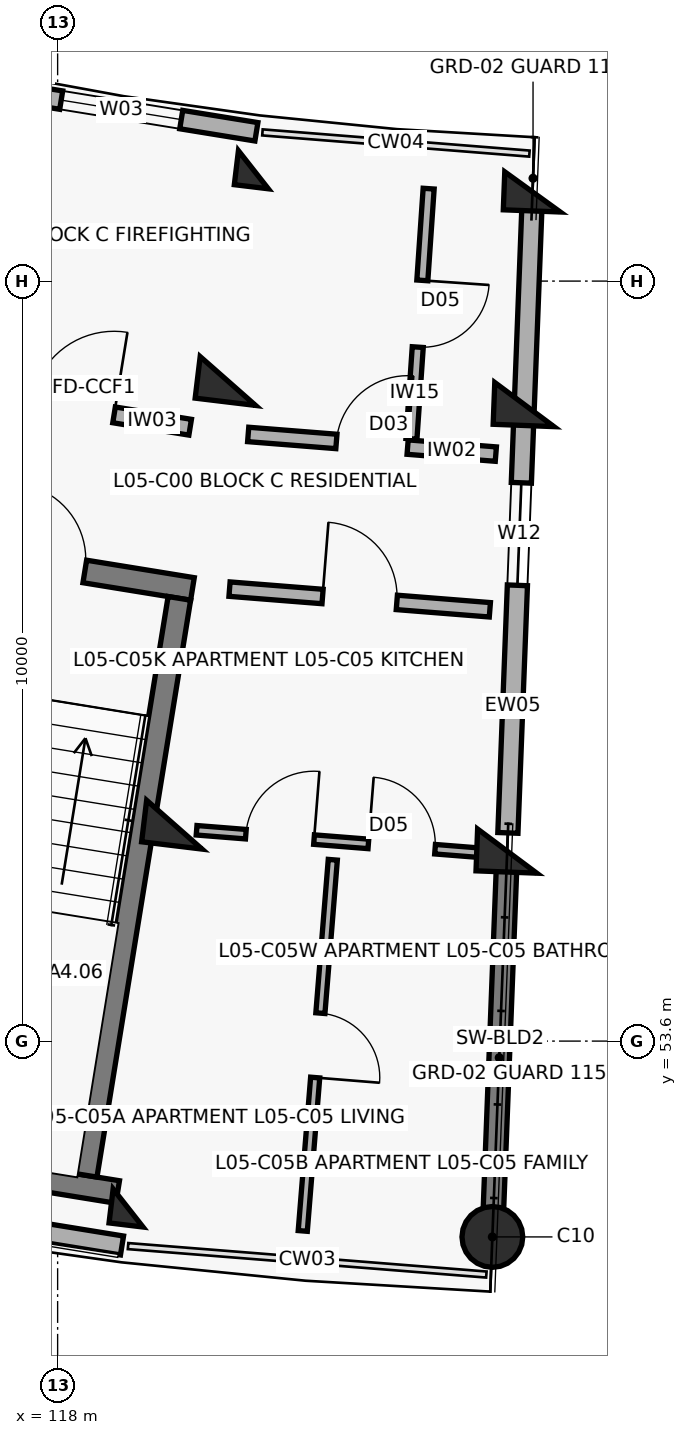
"""IFC4 building model, lengths in metres.
Left out: names, types, materials, properties, quantities, classifications, styles, units other than length and angle.
Written with IfcOpenShell. Run it as: python <this file> out.ifc"""

import sys

from ifc_helpers import new_model, si_unit, direction, frame, frame_2d, origin, origin_2d, place, context, subcontext, project, spatial, rectangle, circle, extrude, element, fill, save


model = new_model("IFC4")
c1 = context("Model", 3, precision=1e-05, world=origin(), true_north=direction((0.0, 1.0)))
c2 = subcontext(c1, "Body", "Model", "MODEL_VIEW")
j1 = project(units=[si_unit("LENGTHUNIT", "METRE"), si_unit("PLANEANGLEUNIT", "RADIAN")], contexts=[c1])
p1 = place(None, origin())
s1 = spatial("IfcSite", under=j1, at=p1, CompositionType="ELEMENT")
p2 = place(p1, origin())
s2 = spatial("IfcBuilding", under=s1, at=p2, CompositionType="ELEMENT")
p3 = place(p2, frame((0.0, 0.0, 17.4)))
s3 = spatial("IfcBuildingStorey", under=s2, at=p3, CompositionType="ELEMENT", Elevation=17.4)
p4 = place(p3, frame((120.575, 65.065, 0.0), z_axis=(0.0, 0.0, 1.0), x_axis=(-0.119790293837, -0.992799217114, 0.0)))
e1 = element("IfcColumn", 1, at=p4, inside=s3, PredefinedType="COLUMN", context=c2, shape_type="SweptSolid", body=[
    extrude(rectangle(XDim=0.45, YDim=0.45, at=origin_2d()), origin(), (0.0, 0.0, 1.0), 3.1),
])
for number, where, z_axis, x_axis in (
    (2, (120.24, 62.285, 0.0), (0.0, 0.0, 1.0), (-0.12, -0.993, 0.0)),
    (3, (119.535, 56.448, 0.0), (0.0, 0.0, 1.0), (-0.12, -0.993, 0.0)),
):
    element("IfcColumn", number, at=place(p3, frame(where, z_axis=z_axis, x_axis=x_axis)), inside=s3, PredefinedType="COLUMN", context=c2, shape_type="SweptSolid", body=[
        extrude(rectangle(XDim=0.55, YDim=0.8, at=origin_2d()), origin(), (0.0, 0.0, 1.0), 3.1),
    ])
p5 = place(p3, frame((118.927, 51.404, 0.0), z_axis=(0.0, 0.0, 1.0), x_axis=(-0.119790293837, -0.992799217114, 0.0)))
e4 = element("IfcColumn", 4, at=p5, inside=s3, PredefinedType="COLUMN", context=c2, shape_type="SweptSolid", body=[
    extrude(rectangle(XDim=0.45, YDim=0.45, at=origin_2d()), origin(), (0.0, 0.0, 1.0), 3.1),
])
p6 = place(p3, frame((124.248, 64.773, 0.0), z_axis=(0.0, 0.0, 1.0), x_axis=(-0.038387809088, -0.999262916411, 0.0)))
e5 = element("IfcColumn", 5, at=p6, inside=s3, PredefinedType="COLUMN", context=c2, shape_type="SweptSolid", body=[
    extrude(rectangle(XDim=0.5, YDim=0.75, at=origin_2d()), origin(), (0.0, 0.0, 1.0), 3.1),
])
for number, where, z_axis, x_axis in (
    (6, (124.14, 61.975, 0.0), (0.0, 0.0, 1.0), (-0.038, -0.999, 0.0)),
    (7, (123.915, 56.1, 0.0), (0.0, 0.0, 1.0), (-0.038, -0.999, 0.0)),
):
    element("IfcColumn", number, at=place(p3, frame(where, z_axis=z_axis, x_axis=x_axis)), inside=s3, PredefinedType="COLUMN", context=c2, shape_type="SweptSolid", body=[
        extrude(rectangle(XDim=0.55, YDim=0.8, at=origin_2d()), origin(), (0.0, 0.0, 1.0), 3.1),
    ])
p7 = place(p3, frame((123.72, 51.023, 0.0), z_axis=(0.0, 0.0, 1.0), x_axis=(-0.038387809088, -0.999262916411, 0.0)))
e8 = element("IfcColumn", 8, at=p7, inside=s3, PredefinedType="COLUMN", context=c2, shape_type="SweptSolid", body=[
    extrude(circle(Radius=0.4, at=origin_2d()), origin(), (0.0, 0.0, 1.0), 3.1),
])
p8 = place(p3, frame((123.908, 55.92, 0.0), z_axis=(0.0, 0.0, 1.0), x_axis=(-0.038381471406, -0.99926315986, 0.0)))
e9 = element("IfcWall", 9, at=p8, inside=s3, PredefinedType="SHEAR", context=c2, shape_type="SweptSolid", body=[
    extrude(rectangle(XDim=4.72, YDim=0.27, at=frame_2d((2.36, 0.0))), origin(), (0.0, 0.0, 1.0), 2.86),
])
p9 = place(p3, frame((114.1, 51.681, 0.0), z_axis=(0.0, 0.0, 1.0), x_axis=(0.987080750493, -0.160223568819, 0.0)))
e10 = element("IfcWall", 10, at=p9, inside=s3, PredefinedType="SOLIDWALL", context=c2, shape_type="SweptSolid", body=[
    extrude(rectangle(XDim=4.809, YDim=0.252, at=frame_2d((2.404, 0.0))), origin(), (0.0, 0.0, 1.0), 2.25),
])
p10 = place(p3, frame((117.058, 66.142, 0.0), z_axis=(0.0, 0.0, 1.0), x_axis=(0.987080874485, -0.160222804952, 0.0)))
e11 = element("IfcWall", 11, at=p10, inside=s3, PredefinedType="SOLIDWALL", context=c2, shape_type="SweptSolid", body=[
    extrude(rectangle(XDim=3.604, YDim=0.245, at=frame_2d((1.802, 0.0))), origin(), (0.0, 0.0, 1.0), 2.25),
])
p11 = place(p10, frame((1.002, 0.0, 0.32)))
e12 = element("IfcOpeningElement", 12, at=p11, cuts=e11, PredefinedType="OPENING", context=c2, shape_type="SweptSolid", body=[
    extrude(rectangle(XDim=1.6, YDim=1.5, at=frame_2d((0.8, 0.75))), frame((0.0, 0.133, 0.0), z_axis=(0.0, -1.0, 0.0), x_axis=(1.0, 0.0, 0.0)), (0.0, 0.0, 1.0), 0.265),
])
p12 = place(p3, frame((124.239, 64.533, 0.0), z_axis=(0.0, 0.0, 1.0), x_axis=(-0.038407966241, -0.999262141847, 0.0)))
e13 = element("IfcWall", 13, at=p12, inside=s3, PredefinedType="SOLIDWALL", context=c2, shape_type="SweptSolid", body=[
    extrude(rectangle(XDim=8.2, YDim=0.265, at=frame_2d((4.1, 0.0))), origin(), (0.0, 0.0, 1.0), 2.18),
])
p13 = place(p12, frame((3.59, 0.0, 0.75)))
e14 = element("IfcOpeningElement", 14, at=p13, cuts=e13, PredefinedType="OPENING", context=c2, shape_type="SweptSolid", body=[
    extrude(rectangle(XDim=1.35, YDim=1.35, at=frame_2d((0.675, 0.675))), frame((0.0, 0.142, 0.0), z_axis=(0.0, -1.0, 0.0), x_axis=(1.0, 0.0, 0.0)), (0.0, 0.0, 1.0), 0.285),
])
p14 = place(p3, frame((115.954, 60.169, 0.0), z_axis=(0.0, 0.0, 1.0), x_axis=(0.987077443397, -0.160243941341, 0.0)))
e15 = element("IfcWall", 15, at=p14, inside=s3, PredefinedType="SHEAR", context=c2, shape_type="SweptSolid", body=[
    extrude(rectangle(XDim=3.87, YDim=0.3, at=frame_2d((1.935, 0.0))), origin(), (0.0, 0.0, 1.0), 3.1),
])
p15 = place(p14, frame((1.435, 0.0, 0.0)))
e16 = element("IfcOpeningElement", 16, at=p15, cuts=e15, PredefinedType="OPENING", context=c2, shape_type="SweptSolid", body=[
    extrude(rectangle(XDim=1.0, YDim=2.15, at=frame_2d((0.5, 1.075))), frame((0.0, 0.16, 0.0), z_axis=(0.0, -1.0, 0.0), x_axis=(1.0, 0.0, 0.0)), (0.0, 0.0, 1.0), 0.32),
])
p16 = place(p3, frame((114.377, 52.331, 0.0), z_axis=(0.0, 0.0, 1.0), x_axis=(0.987077474317, -0.16024375088, 0.0)))
e17 = element("IfcWall", 17, at=p16, inside=s3, PredefinedType="SHEAR", context=c2, shape_type="SweptSolid", body=[
    extrude(rectangle(XDim=4.47, YDim=0.3, at=frame_2d((2.235, 0.0))), origin(), (0.0, 0.0, 1.0), 3.1),
])
p17 = place(p3, frame((119.602, 59.425, 0.0), z_axis=(0.0, 0.0, 1.0), x_axis=(-0.160201584773, -0.987084318706, 0.0)))
e18 = element("IfcWall", 18, at=p17, inside=s3, PredefinedType="SHEAR", context=c2, shape_type="SweptSolid", body=[
    extrude(rectangle(XDim=7.69, YDim=0.3, at=frame_2d((3.845, 0.0))), origin(), (0.0, 0.0, 1.0), 3.1),
])
p18 = place(p3, frame((116.656, 62.178, 0.0), z_axis=(0.0, 0.0, 1.0), x_axis=(0.987083140276, -0.16020884552, 0.0)))
e19 = element("IfcWall", 19, at=p18, inside=s3, PredefinedType="SOLIDWALL", context=c2, shape_type="SweptSolid", body=[
    extrude(rectangle(XDim=3.129, YDim=0.21, at=frame_2d((1.564, 0.0))), origin(), (0.0, 0.0, 1.0), 2.08),
])
p19 = place(p18, frame((1.014, 0.0, 0.0)))
e20 = element("IfcOpeningElement", 20, at=p19, cuts=e19, PredefinedType="OPENING", context=c2, shape_type="SweptSolid", body=[
    extrude(rectangle(XDim=1.1, YDim=2.15, at=frame_2d((0.55, 1.075))), frame((0.0, 0.115, 0.0), z_axis=(0.0, -1.0, 0.0), x_axis=(1.0, 0.0, 0.0)), (0.0, 0.0, 1.0), 0.23),
])
p20 = place(p3, frame((120.261, 59.547, 0.0), z_axis=(0.0, 0.0, 1.0), x_axis=(0.996862545573, -0.079152165058, 0.0)))
e21 = element("IfcWall", 21, at=p20, inside=s3, PredefinedType="SOLIDWALL", context=c2, shape_type="SweptSolid", body=[
    extrude(rectangle(XDim=3.436, YDim=0.19, at=frame_2d((1.718, 0.0))), origin(), (0.0, 0.0, 1.0), 2.08),
])
p21 = place(p20, frame((1.228, 0.0, 0.0)))
e22 = element("IfcOpeningElement", 22, at=p21, cuts=e21, PredefinedType="OPENING", context=c2, shape_type="SweptSolid", body=[
    extrude(rectangle(XDim=0.98, YDim=2.15, at=frame_2d((0.49, 1.075))), frame((0.0, 0.105, 0.0), z_axis=(0.0, -1.0, 0.0), x_axis=(1.0, 0.0, 0.0)), (0.0, 0.0, 1.0), 0.21),
])
p22 = place(p3, frame((120.507, 61.582, 0.0), z_axis=(0.0, 0.0, 1.0), x_axis=(0.996860715473, -0.07917521043, 0.0)))
e23 = element("IfcWall", 23, at=p22, inside=s3, PredefinedType="SOLIDWALL", context=c2, shape_type="SweptSolid", body=[
    extrude(rectangle(XDim=3.269, YDim=0.19, at=frame_2d((1.634, 0.0))), origin(), (0.0, 0.0, 1.0), 2.08),
])
p23 = place(p22, frame((1.164, 0.0, 0.0)))
e24 = element("IfcOpeningElement", 24, at=p23, cuts=e23, PredefinedType="OPENING", context=c2, shape_type="SweptSolid", body=[
    extrude(rectangle(XDim=0.94, YDim=2.1, at=frame_2d((0.47, 1.05))), frame((0.0, 0.105, 0.0), z_axis=(0.0, -1.0, 0.0), x_axis=(1.0, 0.0, 0.0)), (0.0, 0.0, 1.0), 0.21),
])
p24 = place(p3, frame((122.881, 64.816, 0.0), z_axis=(0.0, 0.0, 1.0), x_axis=(-0.068581194944, -0.997645538105, 0.0)))
e25 = element("IfcWall", 25, at=p24, inside=s3, PredefinedType="PARTITIONING", context=c2, shape_type="SweptSolid", body=[
    extrude(rectangle(XDim=3.3, YDim=0.145, at=frame_2d((1.65, 0.0))), origin(), (0.0, 0.0, 1.0), 2.08),
])
p25 = place(p24, frame((1.21, 0.0, 0.0)))
e26 = element("IfcOpeningElement", 26, at=p25, cuts=e25, PredefinedType="OPENING", context=c2, shape_type="SweptSolid", body=[
    extrude(rectangle(XDim=0.88, YDim=2.1, at=frame_2d((0.44, 1.05))), frame((0.0, 0.083, 0.0), z_axis=(0.0, -1.0, 0.0), x_axis=(1.0, 0.0, 0.0)), (0.0, 0.0, 1.0), 0.165),
])
p26 = place(p3, frame((119.828, 56.374, 0.0), z_axis=(0.0, 0.0, 1.0), x_axis=(0.996863138536, -0.079144696778, 0.0)))
e27 = element("IfcWall", 27, at=p26, inside=s3, PredefinedType="PARTITIONING", context=c2, shape_type="SweptSolid", body=[
    extrude(rectangle(XDim=3.797, YDim=0.125, at=frame_2d((1.899, 0.0))), origin(), (0.0, 0.0, 1.0), 2.08),
])
p27 = place(p26, frame((0.65, 0.0, 0.0)))
e28 = element("IfcOpeningElement", 28, at=p27, cuts=e27, PredefinedType="OPENING", context=c2, shape_type="SweptSolid", body=[
    extrude(rectangle(XDim=0.9, YDim=2.1, at=frame_2d((0.45, 1.05))), frame((0.0, 0.073, 0.0), z_axis=(0.0, -1.0, 0.0), x_axis=(1.0, 0.0, 0.0)), (0.0, 0.0, 1.0), 0.145),
])
p28 = place(p26, frame((2.267, 0.0, 0.0)))
e29 = element("IfcOpeningElement", 29, at=p28, cuts=e27, PredefinedType="OPENING", context=c2, shape_type="SweptSolid", body=[
    extrude(rectangle(XDim=0.88, YDim=2.1, at=frame_2d((0.44, 1.05))), frame((0.0, 0.073, 0.0), z_axis=(0.0, -1.0, 0.0), x_axis=(1.0, 0.0, 0.0)), (0.0, 0.0, 1.0), 0.145),
])
p29 = place(p3, frame((121.62, 55.986, 0.0), z_axis=(0.0, 0.0, 1.0), x_axis=(-0.080666032472, -0.996741185667, 0.0)))
e30 = element("IfcWall", 30, at=p29, inside=s3, PredefinedType="PARTITIONING", context=c2, shape_type="SweptSolid", body=[
    extrude(rectangle(XDim=4.9, YDim=0.12, at=frame_2d((2.45, 0.0))), origin(), (0.0, 0.0, 1.0), 2.08),
])
p30 = place(p29, frame((2.025, 0.0, 0.0)))
e31 = element("IfcOpeningElement", 31, at=p30, cuts=e30, PredefinedType="OPENING", context=c2, shape_type="SweptSolid", body=[
    extrude(rectangle(XDim=0.85, YDim=2.1, at=frame_2d((0.425, 1.05))), frame((0.0, 0.07, 0.0), z_axis=(0.0, -1.0, 0.0), x_axis=(1.0, 0.0, 0.0)), (0.0, 0.0, 1.0), 0.14),
])
p31 = place(p11, origin())
e32 = element("IfcWindow", 32, at=p31, inside=s3, PartitioningType="DOUBLE_PANEL_VERTICAL", PredefinedType="WINDOW", context=c2, shape_type="SweptSolid", body=[
    extrude(rectangle(XDim=1.6, YDim=1.5, at=frame_2d((0.8, 0.75))), frame((0.0, 0.03, 0.0), z_axis=(0.0, -1.0, 0.0), x_axis=(1.0, 0.0, 0.0)), (0.0, 0.0, 1.0), 0.06),
])
fill(e12, e32)
p32 = place(p13, origin())
e33 = element("IfcWindow", 33, at=p32, inside=s3, PartitioningType="DOUBLE_PANEL_VERTICAL", PredefinedType="WINDOW", context=c2, shape_type="SweptSolid", body=[
    extrude(rectangle(XDim=1.35, YDim=1.35, at=frame_2d((0.675, 0.675))), frame((0.0, 0.03, 0.0), z_axis=(0.0, -1.0, 0.0), x_axis=(1.0, 0.0, 0.0)), (0.0, 0.0, 1.0), 0.06),
])
fill(e14, e33)
p33 = place(p15, origin())
e34 = element("IfcDoor", 34, at=p33, inside=s3, OperationType="SINGLE_SWING_LEFT", PredefinedType="DOOR", context=c2, shape_type="SweptSolid", body=[
    extrude(rectangle(XDim=1.0, YDim=2.15, at=frame_2d((0.5, 1.075))), frame((0.0, 0.025, 0.0), z_axis=(0.0, -1.0, 0.0), x_axis=(1.0, 0.0, 0.0)), (0.0, 0.0, 1.0), 0.05),
])
fill(e16, e34)
p34 = place(p19, origin())
e35 = element("IfcDoor", 35, at=p34, inside=s3, OperationType="SINGLE_SWING_RIGHT", PredefinedType="DOOR", context=c2, shape_type="SweptSolid", body=[
    extrude(rectangle(XDim=1.1, YDim=2.15, at=frame_2d((0.55, 1.075))), frame((0.0, 0.025, 0.0), z_axis=(0.0, -1.0, 0.0), x_axis=(1.0, 0.0, 0.0)), (0.0, 0.0, 1.0), 0.05),
])
fill(e20, e35)
p35 = place(p21, origin())
e36 = element("IfcDoor", 36, at=p35, inside=s3, OperationType="SINGLE_SWING_LEFT", PredefinedType="DOOR", context=c2, shape_type="SweptSolid", body=[
    extrude(rectangle(XDim=0.98, YDim=2.15, at=frame_2d((0.49, 1.075))), frame((0.0, 0.025, 0.0), z_axis=(0.0, -1.0, 0.0), x_axis=(1.0, 0.0, 0.0)), (0.0, 0.0, 1.0), 0.05),
])
fill(e22, e36)
p36 = place(p23, origin())
e37 = element("IfcDoor", 37, at=p36, inside=s3, OperationType="SINGLE_SWING_RIGHT", PredefinedType="DOOR", context=c2, shape_type="SweptSolid", body=[
    extrude(rectangle(XDim=0.94, YDim=2.1, at=frame_2d((0.47, 1.05))), frame((0.0, 0.025, 0.0), z_axis=(0.0, -1.0, 0.0), x_axis=(1.0, 0.0, 0.0)), (0.0, 0.0, 1.0), 0.05),
])
fill(e24, e37)
p37 = place(p25, origin())
e38 = element("IfcDoor", 38, at=p37, inside=s3, OperationType="SINGLE_SWING_LEFT", PredefinedType="DOOR", context=c2, shape_type="SweptSolid", body=[
    extrude(rectangle(XDim=0.88, YDim=2.1, at=frame_2d((0.44, 1.05))), frame((0.0, 0.025, 0.0), z_axis=(0.0, -1.0, 0.0), x_axis=(1.0, 0.0, 0.0)), (0.0, 0.0, 1.0), 0.05),
])
fill(e26, e38)
p38 = place(p27, origin())
e39 = element("IfcDoor", 39, at=p38, inside=s3, OperationType="SINGLE_SWING_RIGHT", PredefinedType="DOOR", context=c2, shape_type="SweptSolid", body=[
    extrude(rectangle(XDim=0.9, YDim=2.1, at=frame_2d((0.45, 1.05))), frame((0.0, 0.025, 0.0), z_axis=(0.0, -1.0, 0.0), x_axis=(1.0, 0.0, 0.0)), (0.0, 0.0, 1.0), 0.05),
])
fill(e28, e39)
p39 = place(p28, origin())
e40 = element("IfcDoor", 40, at=p39, inside=s3, OperationType="SINGLE_SWING_LEFT", PredefinedType="DOOR", context=c2, shape_type="SweptSolid", body=[
    extrude(rectangle(XDim=0.88, YDim=2.1, at=frame_2d((0.44, 1.05))), frame((0.0, 0.025, 0.0), z_axis=(0.0, -1.0, 0.0), x_axis=(1.0, 0.0, 0.0)), (0.0, 0.0, 1.0), 0.05),
])
fill(e29, e40)
p40 = place(p30, origin())
e41 = element("IfcDoor", 41, at=p40, inside=s3, OperationType="SINGLE_SWING_RIGHT", PredefinedType="DOOR", context=c2, shape_type="SweptSolid", body=[
    extrude(rectangle(XDim=0.85, YDim=2.1, at=frame_2d((0.425, 1.05))), frame((0.0, 0.025, 0.0), z_axis=(0.0, -1.0, 0.0), x_axis=(1.0, 0.0, 0.0)), (0.0, 0.0, 1.0), 0.05),
])
fill(e31, e41)
save(model, sys.argv[1])
